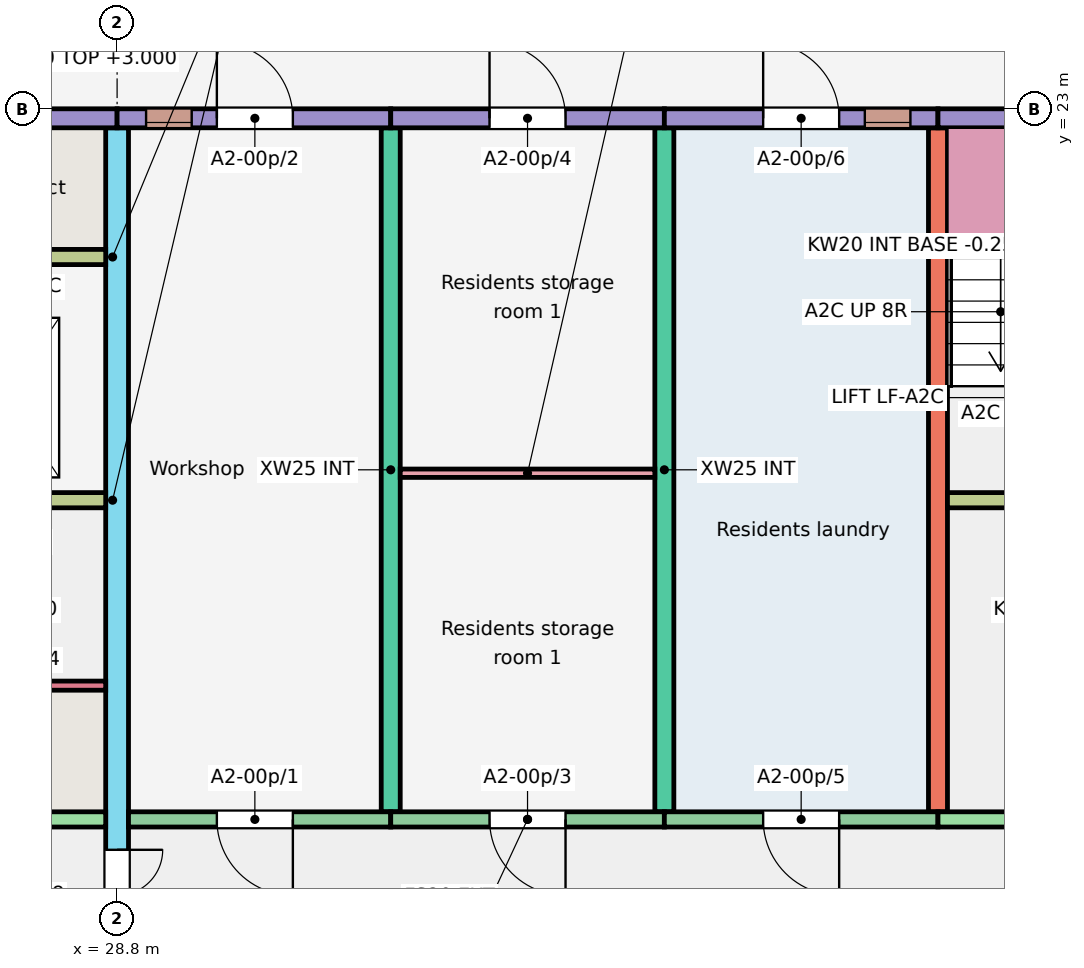
"""IFC4 building model, lengths in metres.
Left out: names, types, materials, properties, quantities, classifications, styles, units other than length and angle.
Written with IfcOpenShell. Run it as: python <this file> out.ifc"""

import sys

from ifc_helpers import new_model, si_unit, direction, frame, frame_2d, origin, place, context, subcontext, project, spatial, rectangle, extrude, element, fill, save


model = new_model("IFC4")
c1 = context("Model", 3, precision=1e-05, world=origin(), true_north=direction((0.0, 1.0)))
c2 = subcontext(c1, "Body", "Model", "MODEL_VIEW")
j1 = project(units=[si_unit("LENGTHUNIT", "METRE"), si_unit("PLANEANGLEUNIT", "RADIAN")], contexts=[c1])
p1 = place(None, origin())
s1 = spatial("IfcSite", under=j1, at=p1, CompositionType="ELEMENT")
p2 = place(p1, origin())
s2 = spatial("IfcBuilding", under=s1, at=p2, CompositionType="ELEMENT")
p3 = place(p2, origin())
s3 = spatial("IfcBuildingStorey", under=s2, at=p3, CompositionType="ELEMENT", Elevation=0.0)
p4 = place(p3, frame((28.8, 11.75, -0.25), z_axis=(0.0, 0.0, 1.0), x_axis=(0.0, 1.0, 0.0)))
e1 = element("IfcWall", 1, at=p4, inside=s3, PredefinedType="SHEAR", context=c2, shape_type="SweptSolid", body=[
    extrude(rectangle(XDim=11.0, YDim=0.3, at=frame_2d((5.5, 0.0))), origin(), (0.0, 0.0, 1.0), 3.25),
])
p5 = place(p4, frame((0.3, 0.0, 0.25)))
e2 = element("IfcOpeningElement", 2, at=p5, cuts=e1, PredefinedType="OPENING", context=c2, shape_type="SweptSolid", body=[
    extrude(rectangle(XDim=1.2, YDim=2.1, at=frame_2d((0.6, 1.05))), frame((0.0, 0.16, 0.0), z_axis=(0.0, -1.0, 0.0), x_axis=(1.0, 0.0, 0.0)), (0.0, 0.0, 1.0), 0.32),
])
for number, where, z_axis, x_axis in (
    (3, (32.4, 13.75, -0.25), (0.0, 0.0, 1.0), (0.0, 1.0, 0.0)),
    (4, (36.0, 13.75, -0.25), (0.0, 0.0, 1.0), (0.0, 1.0, 0.0)),
    (5, (39.6, 13.75, -0.25), (0.0, 0.0, 1.0), (0.0, 1.0, 0.0)),
):
    element("IfcWall", number, at=place(p3, frame(where, z_axis=z_axis, x_axis=x_axis)), inside=s3, PredefinedType="SHEAR", context=c2, shape_type="SweptSolid", body=[
        extrude(rectangle(XDim=9.0, YDim=0.25, at=frame_2d((4.5, 0.0))), origin(), (0.0, 0.0, 1.0), 3.25),
    ])
p6 = place(p3, frame((22.8, 22.875, -0.25), z_axis=(0.0, 0.0, 1.0), x_axis=(1.0, 0.0, 0.0)))
e6 = element("IfcWall", 6, at=p6, inside=s3, PredefinedType="SOLIDWALL", context=c2, shape_type="SweptSolid", body=[
    extrude(rectangle(XDim=6.0, YDim=0.25, at=frame_2d((3.0, 0.0))), origin(), (0.0, 0.0, 1.0), 3.25),
])
p7 = place(p6, frame((1.025, 0.0, 0.25)))
e7 = element("IfcOpeningElement", 7, at=p7, cuts=e6, PredefinedType="OPENING", context=c2, shape_type="SweptSolid", body=[
    extrude(rectangle(XDim=1.1, YDim=2.1, at=frame_2d((0.55, 1.05))), frame((0.0, 0.135, 0.0), z_axis=(0.0, -1.0, 0.0), x_axis=(1.0, 0.0, 0.0)), (0.0, 0.0, 1.0), 0.27),
])
p8 = place(p3, frame((22.8, 13.65, -0.25), z_axis=(0.0, 0.0, 1.0), x_axis=(1.0, 0.0, 0.0)))
e8 = element("IfcWall", 8, at=p8, inside=s3, PredefinedType="SHEAR", context=c2, shape_type="SweptSolid", body=[
    extrude(rectangle(XDim=5.85, YDim=0.2, at=frame_2d((2.925, 0.0))), origin(), (0.0, 0.0, 1.0), 3.25),
])
p9 = place(p8, frame((2.438, 0.0, 0.25)))
e9 = element("IfcOpeningElement", 9, at=p9, cuts=e8, PredefinedType="OPENING", context=c2, shape_type="SweptSolid", body=[
    extrude(rectangle(XDim=1.1, YDim=2.1, at=frame_2d((0.55, 1.05))), frame((0.0, 0.11, 0.0), z_axis=(0.0, -1.0, 0.0), x_axis=(1.0, 0.0, 0.0)), (0.0, 0.0, 1.0), 0.22),
])
p10 = place(p3, frame((22.925, 17.85, -0.25), z_axis=(0.0, 0.0, 1.0), x_axis=(1.0, 0.0, 0.0)))
e10 = element("IfcWall", 10, at=p10, inside=s3, PredefinedType="SHEAR", context=c2, shape_type="SweptSolid", body=[
    extrude(rectangle(XDim=5.725, YDim=0.2, at=frame_2d((2.862, 0.0))), origin(), (0.0, 0.0, 1.0), 3.25),
])
p11 = place(p10, frame((0.95, 0.0, 0.25)))
e11 = element("IfcOpeningElement", 11, at=p11, cuts=e10, PredefinedType="OPENING", context=c2, shape_type="SweptSolid", body=[
    extrude(rectangle(XDim=1.0, YDim=2.1, at=frame_2d((0.5, 1.05))), frame((0.0, 0.11, 0.0), z_axis=(0.0, -1.0, 0.0), x_axis=(1.0, 0.0, 0.0)), (0.0, 0.0, 1.0), 0.22),
])
p12 = place(p10, frame((3.863, 0.0, 0.25)))
e12 = element("IfcOpeningElement", 12, at=p12, cuts=e10, PredefinedType="OPENING", context=c2, shape_type="SweptSolid", body=[
    extrude(rectangle(XDim=1.1, YDim=2.1, at=frame_2d((0.55, 1.05))), frame((0.0, 0.11, 0.0), z_axis=(0.0, -1.0, 0.0), x_axis=(1.0, 0.0, 0.0)), (0.0, 0.0, 1.0), 0.22),
])
p13 = place(p3, frame((26.025, 21.05, -0.25), z_axis=(0.0, 0.0, 1.0), x_axis=(1.0, 0.0, 0.0)))
e13 = element("IfcWall", 13, at=p13, inside=s3, PredefinedType="SHEAR", context=c2, shape_type="SweptSolid", body=[
    extrude(rectangle(XDim=2.625, YDim=0.2, at=frame_2d((1.312, 0.0))), origin(), (0.0, 0.0, 1.0), 3.25),
])
p14 = place(p3, frame((27.52, 15.41, -0.25), z_axis=(0.0, 0.0, 1.0), x_axis=(1.0, 0.0, 0.0)))
e14 = element("IfcWall", 14, at=p14, inside=s3, PredefinedType="SHEAR", context=c2, shape_type="SweptSolid", body=[
    extrude(rectangle(XDim=1.13, YDim=0.12, at=frame_2d((0.565, 0.0))), origin(), (0.0, 0.0, 1.0), 3.25),
])
p15 = place(p3, frame((28.8, 22.875, -0.25), z_axis=(0.0, 0.0, 1.0), x_axis=(1.0, 0.0, 0.0)))
e15 = element("IfcWall", 15, at=p15, inside=s3, PredefinedType="SOLIDWALL", context=c2, shape_type="SweptSolid", body=[
    extrude(rectangle(XDim=3.6, YDim=0.25, at=frame_2d((1.8, 0.0))), origin(), (0.0, 0.0, 1.0), 3.25),
])
p16 = place(p15, frame((0.381, 0.0, 2.05)))
e16 = element("IfcOpeningElement", 16, at=p16, cuts=e15, PredefinedType="OPENING", context=c2, shape_type="SweptSolid", body=[
    extrude(rectangle(XDim=0.6, YDim=0.6, at=frame_2d((0.3, 0.3))), frame((0.0, 0.135, 0.0), z_axis=(0.0, -1.0, 0.0), x_axis=(1.0, 0.0, 0.0)), (0.0, 0.0, 1.0), 0.27),
])
p17 = place(p15, frame((1.312, 0.0, 0.25)))
e17 = element("IfcOpeningElement", 17, at=p17, cuts=e15, PredefinedType="OPENING", context=c2, shape_type="SweptSolid", body=[
    extrude(rectangle(XDim=1.0, YDim=2.1, at=frame_2d((0.5, 1.05))), frame((0.0, 0.135, 0.0), z_axis=(0.0, -1.0, 0.0), x_axis=(1.0, 0.0, 0.0)), (0.0, 0.0, 1.0), 0.27),
])
p18 = place(p3, frame((28.95, 13.65, -0.25), z_axis=(0.0, 0.0, 1.0), x_axis=(1.0, 0.0, 0.0)))
e18 = element("IfcWall", 18, at=p18, inside=s3, PredefinedType="SOLIDWALL", context=c2, shape_type="SweptSolid", body=[
    extrude(rectangle(XDim=3.45, YDim=0.2, at=frame_2d((1.725, 0.0))), origin(), (0.0, 0.0, 1.0), 3.25),
])
p19 = place(p18, frame((1.163, 0.0, 0.25)))
e19 = element("IfcOpeningElement", 19, at=p19, cuts=e18, PredefinedType="OPENING", context=c2, shape_type="SweptSolid", body=[
    extrude(rectangle(XDim=1.0, YDim=2.1, at=frame_2d((0.5, 1.05))), frame((0.0, 0.11, 0.0), z_axis=(0.0, -1.0, 0.0), x_axis=(1.0, 0.0, 0.0)), (0.0, 0.0, 1.0), 0.22),
])
p20 = place(p3, frame((32.4, 22.875, -0.25), z_axis=(0.0, 0.0, 1.0), x_axis=(1.0, 0.0, 0.0)))
e20 = element("IfcWall", 20, at=p20, inside=s3, PredefinedType="SOLIDWALL", context=c2, shape_type="SweptSolid", body=[
    extrude(rectangle(XDim=3.6, YDim=0.25, at=frame_2d((1.8, 0.0))), origin(), (0.0, 0.0, 1.0), 3.25),
])
p21 = place(p20, frame((1.3, 0.0, 0.25)))
e21 = element("IfcOpeningElement", 21, at=p21, cuts=e20, PredefinedType="OPENING", context=c2, shape_type="SweptSolid", body=[
    extrude(rectangle(XDim=1.0, YDim=2.1, at=frame_2d((0.5, 1.05))), frame((0.0, 0.135, 0.0), z_axis=(0.0, -1.0, 0.0), x_axis=(1.0, 0.0, 0.0)), (0.0, 0.0, 1.0), 0.27),
])
p22 = place(p3, frame((32.4, 13.65, -0.25), z_axis=(0.0, 0.0, 1.0), x_axis=(1.0, 0.0, 0.0)))
e22 = element("IfcWall", 22, at=p22, inside=s3, PredefinedType="SOLIDWALL", context=c2, shape_type="SweptSolid", body=[
    extrude(rectangle(XDim=3.6, YDim=0.2, at=frame_2d((1.8, 0.0))), origin(), (0.0, 0.0, 1.0), 3.25),
])
p23 = place(p22, frame((1.3, 0.0, 0.25)))
e23 = element("IfcOpeningElement", 23, at=p23, cuts=e22, PredefinedType="OPENING", context=c2, shape_type="SweptSolid", body=[
    extrude(rectangle(XDim=1.0, YDim=2.1, at=frame_2d((0.5, 1.05))), frame((0.0, 0.11, 0.0), z_axis=(0.0, -1.0, 0.0), x_axis=(1.0, 0.0, 0.0)), (0.0, 0.0, 1.0), 0.22),
])
p24 = place(p3, frame((36.0, 22.875, -0.25), z_axis=(0.0, 0.0, 1.0), x_axis=(1.0, 0.0, 0.0)))
e24 = element("IfcWall", 24, at=p24, inside=s3, PredefinedType="SOLIDWALL", context=c2, shape_type="SweptSolid", body=[
    extrude(rectangle(XDim=3.6, YDim=0.25, at=frame_2d((1.8, 0.0))), origin(), (0.0, 0.0, 1.0), 3.25),
])
p25 = place(p24, frame((2.637, 0.0, 2.05)))
e25 = element("IfcOpeningElement", 25, at=p25, cuts=e24, PredefinedType="OPENING", context=c2, shape_type="SweptSolid", body=[
    extrude(rectangle(XDim=0.6, YDim=0.6, at=frame_2d((0.3, 0.3))), frame((0.0, 0.135, 0.0), z_axis=(0.0, -1.0, 0.0), x_axis=(1.0, 0.0, 0.0)), (0.0, 0.0, 1.0), 0.27),
])
p26 = place(p24, frame((1.3, 0.0, 0.25)))
e26 = element("IfcOpeningElement", 26, at=p26, cuts=e24, PredefinedType="OPENING", context=c2, shape_type="SweptSolid", body=[
    extrude(rectangle(XDim=1.0, YDim=2.1, at=frame_2d((0.5, 1.05))), frame((0.0, 0.135, 0.0), z_axis=(0.0, -1.0, 0.0), x_axis=(1.0, 0.0, 0.0)), (0.0, 0.0, 1.0), 0.27),
])
p27 = place(p3, frame((36.0, 13.65, -0.25), z_axis=(0.0, 0.0, 1.0), x_axis=(1.0, 0.0, 0.0)))
e27 = element("IfcWall", 27, at=p27, inside=s3, PredefinedType="SOLIDWALL", context=c2, shape_type="SweptSolid", body=[
    extrude(rectangle(XDim=3.6, YDim=0.2, at=frame_2d((1.8, 0.0))), origin(), (0.0, 0.0, 1.0), 3.25),
])
p28 = place(p27, frame((1.3, 0.0, 0.25)))
e28 = element("IfcOpeningElement", 28, at=p28, cuts=e27, PredefinedType="OPENING", context=c2, shape_type="SweptSolid", body=[
    extrude(rectangle(XDim=1.0, YDim=2.1, at=frame_2d((0.5, 1.05))), frame((0.0, 0.11, 0.0), z_axis=(0.0, -1.0, 0.0), x_axis=(1.0, 0.0, 0.0)), (0.0, 0.0, 1.0), 0.22),
])
p29 = place(p3, frame((39.6, 22.875, -0.25), z_axis=(0.0, 0.0, 1.0), x_axis=(1.0, 0.0, 0.0)))
e29 = element("IfcWall", 29, at=p29, inside=s3, PredefinedType="SOLIDWALL", context=c2, shape_type="SweptSolid", body=[
    extrude(rectangle(XDim=6.0, YDim=0.25, at=frame_2d((3.0, 0.0))), origin(), (0.0, 0.0, 1.0), 3.25),
])
p30 = place(p29, frame((1.025, 0.0, 0.25)))
e30 = element("IfcOpeningElement", 30, at=p30, cuts=e29, PredefinedType="OPENING", context=c2, shape_type="SweptSolid", body=[
    extrude(rectangle(XDim=1.1, YDim=2.1, at=frame_2d((0.55, 1.05))), frame((0.0, 0.135, 0.0), z_axis=(0.0, -1.0, 0.0), x_axis=(1.0, 0.0, 0.0)), (0.0, 0.0, 1.0), 0.27),
])
p31 = place(p3, frame((39.6, 13.65, -0.25), z_axis=(0.0, 0.0, 1.0), x_axis=(1.0, 0.0, 0.0)))
e31 = element("IfcWall", 31, at=p31, inside=s3, PredefinedType="SHEAR", context=c2, shape_type="SweptSolid", body=[
    extrude(rectangle(XDim=5.85, YDim=0.2, at=frame_2d((2.925, 0.0))), origin(), (0.0, 0.0, 1.0), 3.25),
])
p32 = place(p31, frame((2.438, 0.0, 0.25)))
e32 = element("IfcOpeningElement", 32, at=p32, cuts=e31, PredefinedType="OPENING", context=c2, shape_type="SweptSolid", body=[
    extrude(rectangle(XDim=1.1, YDim=2.1, at=frame_2d((0.55, 1.05))), frame((0.0, 0.11, 0.0), z_axis=(0.0, -1.0, 0.0), x_axis=(1.0, 0.0, 0.0)), (0.0, 0.0, 1.0), 0.22),
])
p33 = place(p3, frame((39.725, 17.85, -0.25), z_axis=(0.0, 0.0, 1.0), x_axis=(1.0, 0.0, 0.0)))
e33 = element("IfcWall", 33, at=p33, inside=s3, PredefinedType="SHEAR", context=c2, shape_type="SweptSolid", body=[
    extrude(rectangle(XDim=5.725, YDim=0.2, at=frame_2d((2.862, 0.0))), origin(), (0.0, 0.0, 1.0), 3.25),
])
p34 = place(p33, frame((0.95, 0.0, 0.25)))
e34 = element("IfcOpeningElement", 34, at=p34, cuts=e33, PredefinedType="OPENING", context=c2, shape_type="SweptSolid", body=[
    extrude(rectangle(XDim=1.0, YDim=2.1, at=frame_2d((0.5, 1.05))), frame((0.0, 0.11, 0.0), z_axis=(0.0, -1.0, 0.0), x_axis=(1.0, 0.0, 0.0)), (0.0, 0.0, 1.0), 0.22),
])
p35 = place(p33, frame((3.863, 0.0, 0.25)))
e35 = element("IfcOpeningElement", 35, at=p35, cuts=e33, PredefinedType="OPENING", context=c2, shape_type="SweptSolid", body=[
    extrude(rectangle(XDim=1.1, YDim=2.1, at=frame_2d((0.55, 1.05))), frame((0.0, 0.11, 0.0), z_axis=(0.0, -1.0, 0.0), x_axis=(1.0, 0.0, 0.0)), (0.0, 0.0, 1.0), 0.22),
])
for number, where, z_axis, x_axis in (
    (36, (25.825, 17.85, -1.4), (0.0, 0.0, 1.0), (1.0, 0.0, 0.0)),
    (37, (25.825, 21.05, -1.4), (0.0, 0.0, 1.0), (1.0, 0.0, 0.0)),
):
    element("IfcWall", number, at=place(p3, frame(where, z_axis=z_axis, x_axis=x_axis)), inside=s3, PredefinedType="SHEAR", context=c2, shape_type="SweptSolid", body=[
        extrude(rectangle(XDim=2.975, YDim=0.2, at=frame_2d((1.488, 0.0))), origin(), (0.0, 0.0, 1.0), 1.15),
    ])
p36 = place(p3, frame((28.725, 17.95, -1.4), z_axis=(0.0, 0.0, 1.0), x_axis=(0.0, 1.0, 0.0)))
e38 = element("IfcWall", 38, at=p36, inside=s3, PredefinedType="SHEAR", context=c2, shape_type="SweptSolid", body=[
    extrude(rectangle(XDim=3.0, YDim=0.15, at=frame_2d((1.5, 0.0))), origin(), (0.0, 0.0, 1.0), 1.15),
])
p37 = place(p3, frame((32.525, 18.205, 0.0), z_axis=(0.0, 0.0, 1.0), x_axis=(1.0, 0.0, 0.0)))
e39 = element("IfcWall", 39, at=p37, inside=s3, PredefinedType="PARTITIONING", context=c2, shape_type="SweptSolid", body=[
    extrude(rectangle(XDim=3.35, YDim=0.11, at=frame_2d((1.675, 0.0))), origin(), (0.0, 0.0, 1.0), 2.8),
])
p38 = place(p16, origin())
e40 = element("IfcWindow", 40, at=p38, inside=s3, PartitioningType="SINGLE_PANEL", PredefinedType="WINDOW", context=c2, shape_type="SweptSolid", body=[
    extrude(rectangle(XDim=0.6, YDim=0.6, at=frame_2d((0.3, 0.3))), frame((0.0, -0.025, 0.0), z_axis=(0.0, -1.0, 0.0), x_axis=(1.0, 0.0, 0.0)), (0.0, 0.0, 1.0), 0.06),
])
fill(e16, e40)
p39 = place(p25, origin())
e41 = element("IfcWindow", 41, at=p39, inside=s3, PartitioningType="SINGLE_PANEL", PredefinedType="WINDOW", context=c2, shape_type="SweptSolid", body=[
    extrude(rectangle(XDim=0.6, YDim=0.6, at=frame_2d((0.3, 0.3))), frame((0.0, -0.025, 0.0), z_axis=(0.0, -1.0, 0.0), x_axis=(1.0, 0.0, 0.0)), (0.0, 0.0, 1.0), 0.06),
])
fill(e25, e41)
p40 = place(p19, origin())
e42 = element("IfcDoor", 42, at=p40, inside=s3, OperationType="SINGLE_SWING_RIGHT", PredefinedType="DOOR", context=c2, shape_type="SweptSolid", body=[
    extrude(rectangle(XDim=1.0, YDim=2.1, at=frame_2d((0.5, 1.05))), frame((0.0, 0.025, 0.0), z_axis=(0.0, -1.0, 0.0), x_axis=(1.0, 0.0, 0.0)), (0.0, 0.0, 1.0), 0.05),
])
fill(e19, e42)
p41 = place(p17, origin())
e43 = element("IfcDoor", 43, at=p41, inside=s3, OperationType="SINGLE_SWING_LEFT", PredefinedType="DOOR", context=c2, shape_type="SweptSolid", body=[
    extrude(rectangle(XDim=1.0, YDim=2.1, at=frame_2d((0.5, 1.05))), frame((0.0, 0.025, 0.0), z_axis=(0.0, -1.0, 0.0), x_axis=(1.0, 0.0, 0.0)), (0.0, 0.0, 1.0), 0.05),
])
fill(e17, e43)
p42 = place(p23, origin())
e44 = element("IfcDoor", 44, at=p42, inside=s3, OperationType="SINGLE_SWING_RIGHT", PredefinedType="DOOR", context=c2, shape_type="SweptSolid", body=[
    extrude(rectangle(XDim=1.0, YDim=2.1, at=frame_2d((0.5, 1.05))), frame((0.0, 0.025, 0.0), z_axis=(0.0, -1.0, 0.0), x_axis=(1.0, 0.0, 0.0)), (0.0, 0.0, 1.0), 0.05),
])
fill(e23, e44)
p43 = place(p21, origin())
e45 = element("IfcDoor", 45, at=p43, inside=s3, OperationType="SINGLE_SWING_LEFT", PredefinedType="DOOR", context=c2, shape_type="SweptSolid", body=[
    extrude(rectangle(XDim=1.0, YDim=2.1, at=frame_2d((0.5, 1.05))), frame((0.0, 0.025, 0.0), z_axis=(0.0, -1.0, 0.0), x_axis=(1.0, 0.0, 0.0)), (0.0, 0.0, 1.0), 0.05),
])
fill(e21, e45)
p44 = place(p28, origin())
e46 = element("IfcDoor", 46, at=p44, inside=s3, OperationType="SINGLE_SWING_RIGHT", PredefinedType="DOOR", context=c2, shape_type="SweptSolid", body=[
    extrude(rectangle(XDim=1.0, YDim=2.1, at=frame_2d((0.5, 1.05))), frame((0.0, 0.025, 0.0), z_axis=(0.0, -1.0, 0.0), x_axis=(1.0, 0.0, 0.0)), (0.0, 0.0, 1.0), 0.05),
])
fill(e28, e46)
p45 = place(p26, origin())
e47 = element("IfcDoor", 47, at=p45, inside=s3, OperationType="SINGLE_SWING_LEFT", PredefinedType="DOOR", context=c2, shape_type="SweptSolid", body=[
    extrude(rectangle(XDim=1.0, YDim=2.1, at=frame_2d((0.5, 1.05))), frame((0.0, 0.025, 0.0), z_axis=(0.0, -1.0, 0.0), x_axis=(1.0, 0.0, 0.0)), (0.0, 0.0, 1.0), 0.05),
])
fill(e26, e47)
p46 = place(p5, origin())
e48 = element("IfcDoor", 48, at=p46, inside=s3, OperationType="DOUBLE_DOOR_SINGLE_SWING", PredefinedType="DOOR", context=c2, shape_type="SweptSolid", body=[
    extrude(rectangle(XDim=1.2, YDim=2.1, at=frame_2d((0.6, 1.05))), frame((0.0, 0.025, 0.0), z_axis=(0.0, -1.0, 0.0), x_axis=(1.0, 0.0, 0.0)), (0.0, 0.0, 1.0), 0.05),
])
fill(e2, e48)
save(model, sys.argv[1])
